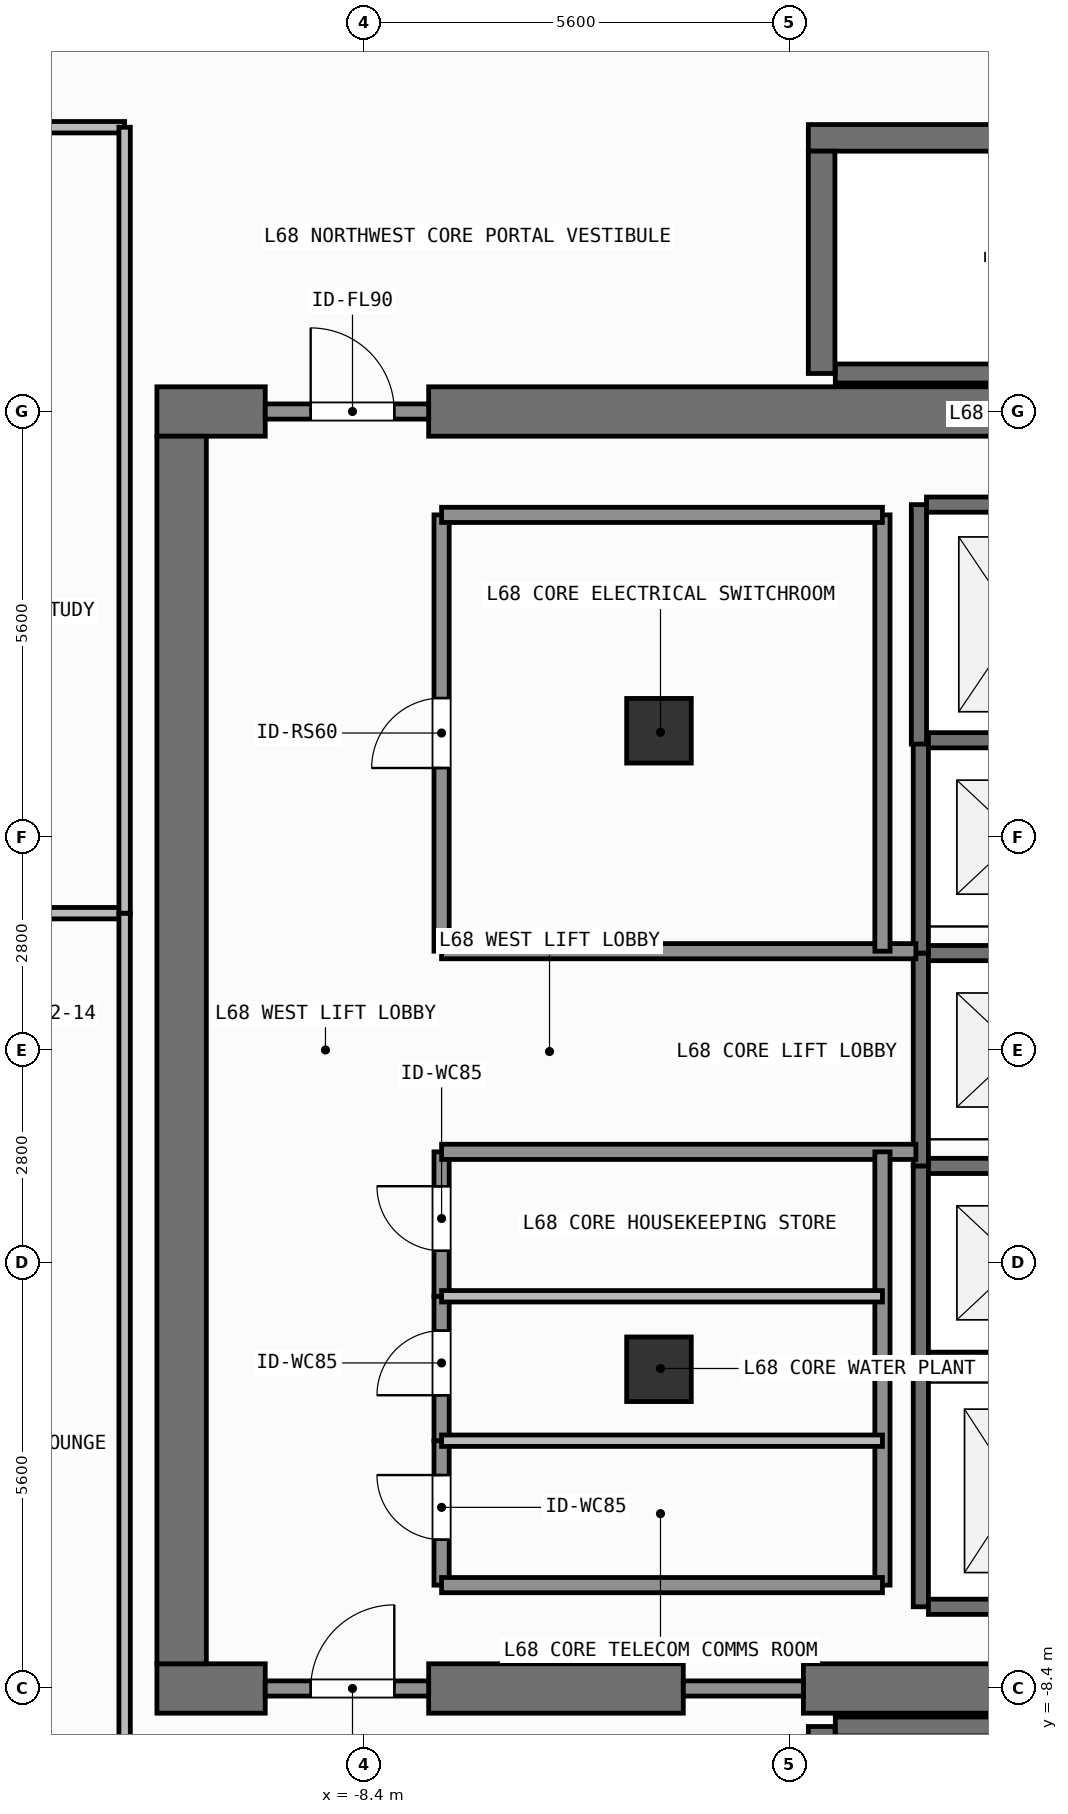
"""IFC4 building model, lengths in metres.
Left out: names, types, materials, properties, quantities, classifications, styles, units other than length and angle.
Written with IfcOpenShell. Run it as: python <this file> out.ifc"""

import sys

from ifc_helpers import new_model, si_unit, direction, frame, frame_2d, origin, origin_2d, place, context, subcontext, project, spatial, rectangle, extrude, element, fill, save


model = new_model("IFC4")
c1 = context("Model", 3, precision=1e-05, world=origin(), true_north=direction((0.0, 1.0)))
c2 = subcontext(c1, "Body", "Model", "MODEL_VIEW")
j1 = project(units=[si_unit("LENGTHUNIT", "METRE"), si_unit("PLANEANGLEUNIT", "RADIAN")], contexts=[c1])
p1 = place(None, origin())
s1 = spatial("IfcSite", under=j1, at=p1, CompositionType="ELEMENT")
p2 = place(p1, origin())
s2 = spatial("IfcBuilding", under=s1, at=p2, CompositionType="ELEMENT")
p3 = place(p2, frame((0.0, 0.0, 278.1)))
s3 = spatial("IfcBuildingStorey", under=s2, at=p3, CompositionType="ELEMENT", Elevation=278.1)
p4 = place(p3, frame((-11.125, -8.4, 0.0), z_axis=(0.0, 0.0, 1.0), x_axis=(1.0, 0.0, 0.0)))
e1 = element("IfcWall", 1, at=p4, inside=s3, PredefinedType="SHEAR", context=c2, shape_type="SweptSolid", body=[
    extrude(rectangle(XDim=1.425, YDim=0.65, at=frame_2d((0.712, 0.0))), origin(), (0.0, 0.0, 1.0), 3.9),
])
p5 = place(p3, frame((-7.55, -8.4, 0.0), z_axis=(0.0, 0.0, 1.0), x_axis=(1.0, 0.0, 0.0)))
e2 = element("IfcWall", 2, at=p5, inside=s3, PredefinedType="SHEAR", context=c2, shape_type="SweptSolid", body=[
    extrude(rectangle(XDim=3.35, YDim=0.65, at=frame_2d((1.675, 0.0))), origin(), (0.0, 0.0, 1.0), 3.9),
])
p6 = place(p3, frame((-2.62, -8.4, 0.0), z_axis=(0.0, 0.0, 1.0), x_axis=(1.0, 0.0, 0.0)))
e3 = element("IfcWall", 3, at=p6, inside=s3, PredefinedType="SHEAR", context=c2, shape_type="SweptSolid", body=[
    extrude(rectangle(XDim=7.27, YDim=0.65, at=frame_2d((3.635, 0.0))), origin(), (0.0, 0.0, 1.0), 3.9),
])
p7 = place(p3, frame((-11.125, 8.4, 0.0), z_axis=(0.0, 0.0, 1.0), x_axis=(1.0, 0.0, 0.0)))
e4 = element("IfcWall", 4, at=p7, inside=s3, PredefinedType="SHEAR", context=c2, shape_type="SweptSolid", body=[
    extrude(rectangle(XDim=1.425, YDim=0.65, at=frame_2d((0.712, 0.0))), origin(), (0.0, 0.0, 1.0), 3.9),
])
p8 = place(p3, frame((-7.55, 8.4, 0.0), z_axis=(0.0, 0.0, 1.0), x_axis=(1.0, 0.0, 0.0)))
e5 = element("IfcWall", 5, at=p8, inside=s3, PredefinedType="SHEAR", context=c2, shape_type="SweptSolid", body=[
    extrude(rectangle(XDim=16.275, YDim=0.65, at=frame_2d((8.138, 0.0))), origin(), (0.0, 0.0, 1.0), 3.9),
])
p9 = place(p3, frame((-10.8, -8.075, 0.0), z_axis=(0.0, 0.0, 1.0), x_axis=(0.0, 1.0, 0.0)))
e6 = element("IfcWall", 6, at=p9, inside=s3, PredefinedType="SHEAR", context=c2, shape_type="SweptSolid", body=[
    extrude(rectangle(XDim=16.15, YDim=0.65, at=frame_2d((8.075, 0.0))), origin(), (0.0, 0.0, 1.0), 3.9),
])
p10 = place(p3, frame((-2.2, -8.9, 0.0), z_axis=(0.0, 0.0, 1.0), x_axis=(1.0, 0.0, 0.0)))
e7 = element("IfcWall", 7, at=p10, inside=s3, PredefinedType="SHEAR", context=c2, shape_type="SweptSolid", body=[
    extrude(rectangle(XDim=6.6, YDim=0.25, at=frame_2d((3.3, 0.0))), origin(), (0.0, 0.0, 1.0), 3.9),
])
p11 = place(p3, frame((-2.38, -11.825, 0.0), z_axis=(0.0, 0.0, 1.0), x_axis=(0.0, 1.0, 0.0)))
e8 = element("IfcWall", 8, at=p11, inside=s3, PredefinedType="SHEAR", context=c2, shape_type="SweptSolid", body=[
    extrude(rectangle(XDim=2.925, YDim=0.35, at=frame_2d((1.462, 0.0))), origin(), (0.0, 0.0, 1.0), 3.9),
])
p12 = place(p3, frame((-2.555, 12.0, 0.0), z_axis=(0.0, 0.0, 1.0), x_axis=(1.0, 0.0, 0.0)))
e9 = element("IfcWall", 9, at=p12, inside=s3, PredefinedType="SHEAR", context=c2, shape_type="SweptSolid", body=[
    extrude(rectangle(XDim=7.31, YDim=0.35, at=frame_2d((3.655, 0.0))), origin(), (0.0, 0.0, 1.0), 3.9),
])
p13 = place(p3, frame((-2.2, 8.9, 0.0), z_axis=(0.0, 0.0, 1.0), x_axis=(1.0, 0.0, 0.0)))
e10 = element("IfcWall", 10, at=p13, inside=s3, PredefinedType="SHEAR", context=c2, shape_type="SweptSolid", body=[
    extrude(rectangle(XDim=6.6, YDim=0.25, at=frame_2d((3.3, 0.0))), origin(), (0.0, 0.0, 1.0), 3.9),
])
p14 = place(p3, frame((-2.38, 8.9, 0.0), z_axis=(0.0, 0.0, 1.0), x_axis=(0.0, 1.0, 0.0)))
e11 = element("IfcWall", 11, at=p14, inside=s3, PredefinedType="SHEAR", context=c2, shape_type="SweptSolid", body=[
    extrude(rectangle(XDim=2.925, YDim=0.35, at=frame_2d((1.462, 0.0))), origin(), (0.0, 0.0, 1.0), 3.9),
])
for number, where, z_axis, x_axis in (
    (12, (-4.52, -4.2, 0.0), (0.0, 0.0, 1.0), (1.0, 0.0, 0.0)),
    (13, (-4.52, 4.2, 0.0), (0.0, 0.0, 1.0), (1.0, 0.0, 0.0)),
):
    element("IfcColumn", number, at=place(p3, frame(where, z_axis=z_axis, x_axis=x_axis)), inside=s3, PredefinedType="COLUMN", context=c2, shape_type="SweptSolid", body=[
        extrude(rectangle(XDim=0.85, YDim=0.85, at=origin_2d()), origin(), (0.0, 0.0, 1.0), 3.9),
    ])
p15 = place(p3, frame((-1.075, -4.275, 0.0), z_axis=(0.0, 0.0, 1.0), x_axis=(0.0, 1.0, 0.0)))
e14 = element("IfcWall", 14, at=p15, inside=s3, PredefinedType="SHEAR", context=c2, shape_type="SweptSolid", body=[
    extrude(rectangle(XDim=2.75, YDim=0.2, at=frame_2d((1.375, 0.0))), origin(), (0.0, 0.0, 1.0), 3.68),
])
for number, where, z_axis, x_axis in (
    (15, (-0.975, -4.075, 0.0), (0.0, 0.0, 1.0), (1.0, 0.0, 0.0)),
    (16, (-0.975, -1.525, 0.0), (0.0, 0.0, 1.0), (1.0, 0.0, 0.0)),
):
    element("IfcWall", number, at=place(p3, frame(where, z_axis=z_axis, x_axis=x_axis)), inside=s3, PredefinedType="SHEAR", context=c2, shape_type="SweptSolid", body=[
        extrude(rectangle(XDim=2.35, YDim=0.2, at=frame_2d((1.175, 0.0))), origin(), (0.0, 0.0, 1.0), 3.68),
    ])
p16 = place(p3, frame((-1.075, -1.525, 0.0), z_axis=(0.0, 0.0, 1.0), x_axis=(0.0, 1.0, 0.0)))
e17 = element("IfcWall", 17, at=p16, inside=s3, PredefinedType="SHEAR", context=c2, shape_type="SweptSolid", body=[
    extrude(rectangle(XDim=2.8, YDim=0.2, at=frame_2d((1.4, 0.0))), origin(), (0.0, 0.0, 1.0), 3.68),
])
p17 = place(p3, frame((-0.975, 1.275, 0.0), z_axis=(0.0, 0.0, 1.0), x_axis=(1.0, 0.0, 0.0)))
e18 = element("IfcWall", 18, at=p17, inside=s3, PredefinedType="SHEAR", context=c2, shape_type="SweptSolid", body=[
    extrude(rectangle(XDim=2.35, YDim=0.2, at=frame_2d((1.175, 0.0))), origin(), (0.0, 0.0, 1.0), 3.68),
])
p18 = place(p3, frame((-1.075, 1.275, 0.0), z_axis=(0.0, 0.0, 1.0), x_axis=(0.0, 1.0, 0.0)))
e19 = element("IfcWall", 19, at=p18, inside=s3, PredefinedType="SHEAR", context=c2, shape_type="SweptSolid", body=[
    extrude(rectangle(XDim=2.8, YDim=0.2, at=frame_2d((1.4, 0.0))), origin(), (0.0, 0.0, 1.0), 3.68),
])
p19 = place(p3, frame((-0.975, 4.075, 0.0), z_axis=(0.0, 0.0, 1.0), x_axis=(1.0, 0.0, 0.0)))
e20 = element("IfcWall", 20, at=p19, inside=s3, PredefinedType="SHEAR", context=c2, shape_type="SweptSolid", body=[
    extrude(rectangle(XDim=2.35, YDim=0.2, at=frame_2d((1.175, 0.0))), origin(), (0.0, 0.0, 1.0), 3.68),
])
p20 = place(p3, frame((-1.1, 4.025, 0.0), z_axis=(0.0, 0.0, 1.0), x_axis=(0.0, 1.0, 0.0)))
e21 = element("IfcWall", 21, at=p20, inside=s3, PredefinedType="SHEAR", context=c2, shape_type="SweptSolid", body=[
    extrude(rectangle(XDim=3.15, YDim=0.2, at=frame_2d((1.575, 0.0))), origin(), (0.0, 0.0, 1.0), 3.68),
])
p21 = place(p3, frame((-1.0, 7.175, 0.0), z_axis=(0.0, 0.0, 1.0), x_axis=(1.0, 0.0, 0.0)))
e22 = element("IfcWall", 22, at=p21, inside=s3, PredefinedType="SHEAR", context=c2, shape_type="SweptSolid", body=[
    extrude(rectangle(XDim=2.4, YDim=0.2, at=frame_2d((1.2, 0.0))), origin(), (0.0, 0.0, 1.0), 3.68),
])
p22 = place(p3, frame((-1.075, -7.325, 0.0), z_axis=(0.0, 0.0, 1.0), x_axis=(0.0, 1.0, 0.0)))
e23 = element("IfcWall", 23, at=p22, inside=s3, PredefinedType="SHEAR", context=c2, shape_type="SweptSolid", body=[
    extrude(rectangle(XDim=3.05, YDim=0.2, at=frame_2d((1.525, 0.0))), origin(), (0.0, 0.0, 1.0), 3.68),
])
p23 = place(p3, frame((-0.975, -7.325, 0.0), z_axis=(0.0, 0.0, 1.0), x_axis=(1.0, 0.0, 0.0)))
e24 = element("IfcWall", 24, at=p23, inside=s3, PredefinedType="SHEAR", context=c2, shape_type="SweptSolid", body=[
    extrude(rectangle(XDim=2.35, YDim=0.2, at=frame_2d((1.175, 0.0))), origin(), (0.0, 0.0, 1.0), 3.68),
])
p24 = place(p3, frame((-9.7, -8.4, 0.0), z_axis=(0.0, 0.0, 1.0), x_axis=(1.0, 0.0, 0.0)))
e25 = element("IfcWall", 25, at=p24, inside=s3, PredefinedType="SOLIDWALL", context=c2, shape_type="SweptSolid", body=[
    extrude(rectangle(XDim=2.15, YDim=0.2, at=frame_2d((1.075, 0.0))), origin(), (0.0, 0.0, 1.0), 2.92),
])
p25 = place(p24, frame((0.598, 0.0, 0.0)))
e26 = element("IfcOpeningElement", 26, at=p25, cuts=e25, PredefinedType="OPENING", context=c2, shape_type="SweptSolid", body=[
    extrude(rectangle(XDim=1.1, YDim=2.15, at=frame_2d((0.55, 1.075))), frame((0.0, 0.11, 0.0), z_axis=(0.0, -1.0, 0.0), x_axis=(1.0, 0.0, 0.0)), (0.0, 0.0, 1.0), 0.22),
])
p26 = place(p3, frame((-9.7, 8.4, 0.0), z_axis=(0.0, 0.0, 1.0), x_axis=(1.0, 0.0, 0.0)))
e27 = element("IfcWall", 27, at=p26, inside=s3, PredefinedType="SOLIDWALL", context=c2, shape_type="SweptSolid", body=[
    extrude(rectangle(XDim=2.15, YDim=0.2, at=frame_2d((1.075, 0.0))), origin(), (0.0, 0.0, 1.0), 2.92),
])
p27 = place(p26, frame((0.598, 0.0, 0.0)))
e28 = element("IfcOpeningElement", 28, at=p27, cuts=e27, PredefinedType="OPENING", context=c2, shape_type="SweptSolid", body=[
    extrude(rectangle(XDim=1.1, YDim=2.15, at=frame_2d((0.55, 1.075))), frame((0.0, 0.11, 0.0), z_axis=(0.0, -1.0, 0.0), x_axis=(1.0, 0.0, 0.0)), (0.0, 0.0, 1.0), 0.22),
])
p28 = place(p3, frame((-7.38, -7.04, 0.0), z_axis=(0.0, 0.0, 1.0), x_axis=(0.0, 1.0, 0.0)))
e29 = element("IfcWall", 29, at=p28, inside=s3, PredefinedType="SOLIDWALL", context=c2, shape_type="SweptSolid", body=[
    extrude(rectangle(XDim=1.9, YDim=0.2, at=frame_2d((0.95, 0.0))), origin(), (0.0, 0.0, 1.0), 3.68),
])
p29 = place(p28, frame((0.598, 0.0, 0.0)))
e30 = element("IfcOpeningElement", 30, at=p29, cuts=e29, PredefinedType="OPENING", context=c2, shape_type="SweptSolid", body=[
    extrude(rectangle(XDim=0.85, YDim=2.1, at=frame_2d((0.425, 1.05))), frame((0.0, 0.11, 0.0), z_axis=(0.0, -1.0, 0.0), x_axis=(1.0, 0.0, 0.0)), (0.0, 0.0, 1.0), 0.22),
])
p30 = place(p3, frame((-7.38, -5.14, 0.0), z_axis=(0.0, 0.0, 1.0), x_axis=(0.0, 1.0, 0.0)))
e31 = element("IfcWall", 31, at=p30, inside=s3, PredefinedType="SOLIDWALL", context=c2, shape_type="SweptSolid", body=[
    extrude(rectangle(XDim=1.9, YDim=0.2, at=frame_2d((0.95, 0.0))), origin(), (0.0, 0.0, 1.0), 3.68),
])
p31 = place(p30, frame((0.598, 0.0, 0.0)))
e32 = element("IfcOpeningElement", 32, at=p31, cuts=e31, PredefinedType="OPENING", context=c2, shape_type="SweptSolid", body=[
    extrude(rectangle(XDim=0.85, YDim=2.1, at=frame_2d((0.425, 1.05))), frame((0.0, 0.11, 0.0), z_axis=(0.0, -1.0, 0.0), x_axis=(1.0, 0.0, 0.0)), (0.0, 0.0, 1.0), 0.22),
])
p32 = place(p3, frame((-7.38, -3.24, 0.0), z_axis=(0.0, 0.0, 1.0), x_axis=(0.0, 1.0, 0.0)))
e33 = element("IfcWall", 33, at=p32, inside=s3, PredefinedType="SOLIDWALL", context=c2, shape_type="SweptSolid", body=[
    extrude(rectangle(XDim=1.9, YDim=0.2, at=frame_2d((0.95, 0.0))), origin(), (0.0, 0.0, 1.0), 3.68),
])
p33 = place(p32, frame((0.598, 0.0, 0.0)))
e34 = element("IfcOpeningElement", 34, at=p33, cuts=e33, PredefinedType="OPENING", context=c2, shape_type="SweptSolid", body=[
    extrude(rectangle(XDim=0.85, YDim=2.1, at=frame_2d((0.425, 1.05))), frame((0.0, 0.11, 0.0), z_axis=(0.0, -1.0, 0.0), x_axis=(1.0, 0.0, 0.0)), (0.0, 0.0, 1.0), 0.22),
])
p34 = place(p3, frame((-7.38, 1.3, 0.0), z_axis=(0.0, 0.0, 1.0), x_axis=(0.0, 1.0, 0.0)))
e35 = element("IfcWall", 35, at=p34, inside=s3, PredefinedType="SOLIDWALL", context=c2, shape_type="SweptSolid", body=[
    extrude(rectangle(XDim=5.74, YDim=0.2, at=frame_2d((2.87, 0.0))), origin(), (0.0, 0.0, 1.0), 3.68),
])
p35 = place(p34, frame((2.41, 0.0, 0.0)))
e36 = element("IfcOpeningElement", 36, at=p35, cuts=e35, PredefinedType="OPENING", context=c2, shape_type="SweptSolid", body=[
    extrude(rectangle(XDim=0.92, YDim=2.1, at=frame_2d((0.46, 1.05))), frame((0.0, 0.11, 0.0), z_axis=(0.0, -1.0, 0.0), x_axis=(1.0, 0.0, 0.0)), (0.0, 0.0, 1.0), 0.22),
])
p36 = place(p3, frame((-16.93, 12.14, 0.0), z_axis=(0.0, 0.0, 1.0), x_axis=(1.0, 0.0, 0.0)))
e37 = element("IfcWall", 37, at=p36, inside=s3, PredefinedType="PARTITIONING", context=c2, shape_type="SweptSolid", body=[
    extrude(rectangle(XDim=5.38, YDim=0.15, at=frame_2d((2.69, 0.0))), origin(), (0.0, 0.0, 1.0), 3.68),
])
p37 = place(p36, frame((2.24, 0.0, 0.0)))
e38 = element("IfcOpeningElement", 38, at=p37, cuts=e37, PredefinedType="OPENING", context=c2, shape_type="SweptSolid", body=[
    extrude(rectangle(XDim=0.9, YDim=2.1, at=frame_2d((0.45, 1.05))), frame((0.0, 0.085, 0.0), z_axis=(0.0, -1.0, 0.0), x_axis=(1.0, 0.0, 0.0)), (0.0, 0.0, 1.0), 0.17),
])
p38 = place(p3, frame((-4.2, -8.4, 0.0), z_axis=(0.0, 0.0, 1.0), x_axis=(1.0, 0.0, 0.0)))
e39 = element("IfcWall", 39, at=p38, inside=s3, PredefinedType="SOLIDWALL", context=c2, shape_type="SweptSolid", body=[
    extrude(rectangle(XDim=1.58, YDim=0.2, at=frame_2d((0.79, 0.0))), origin(), (0.0, 0.0, 1.0), 2.92),
])
for number, where, z_axis, x_axis in (
    (40, (-7.38, -1.34, 0.0), (0.0, 0.0, 1.0), (1.0, 0.0, 0.0)),
    (41, (-7.38, 1.3, 0.0), (0.0, 0.0, 1.0), (1.0, 0.0, 0.0)),
):
    element("IfcWall", number, at=place(p3, frame(where, z_axis=z_axis, x_axis=x_axis)), inside=s3, PredefinedType="SOLIDWALL", context=c2, shape_type="SweptSolid", body=[
        extrude(rectangle(XDim=6.24, YDim=0.2, at=frame_2d((3.12, 0.0))), origin(), (0.0, 0.0, 1.0), 3.68),
    ])
p39 = place(p3, frame((-1.58, -7.04, 0.0), z_axis=(0.0, 0.0, 1.0), x_axis=(0.0, 1.0, 0.0)))
e42 = element("IfcWall", 42, at=p39, inside=s3, PredefinedType="SOLIDWALL", context=c2, shape_type="SweptSolid", body=[
    extrude(rectangle(XDim=5.7, YDim=0.2, at=frame_2d((2.85, 0.0))), origin(), (0.0, 0.0, 1.0), 3.68),
])
p40 = place(p3, frame((-7.38, -7.04, 0.0), z_axis=(0.0, 0.0, 1.0), x_axis=(1.0, 0.0, 0.0)))
e43 = element("IfcWall", 43, at=p40, inside=s3, PredefinedType="SOLIDWALL", context=c2, shape_type="SweptSolid", body=[
    extrude(rectangle(XDim=5.8, YDim=0.2, at=frame_2d((2.9, 0.0))), origin(), (0.0, 0.0, 1.0), 3.68),
])
p41 = place(p3, frame((-1.58, 1.3, 0.0), z_axis=(0.0, 0.0, 1.0), x_axis=(0.0, 1.0, 0.0)))
e44 = element("IfcWall", 44, at=p41, inside=s3, PredefinedType="SOLIDWALL", context=c2, shape_type="SweptSolid", body=[
    extrude(rectangle(XDim=5.74, YDim=0.2, at=frame_2d((2.87, 0.0))), origin(), (0.0, 0.0, 1.0), 3.68),
])
p42 = place(p3, frame((-7.38, 7.04, 0.0), z_axis=(0.0, 0.0, 1.0), x_axis=(1.0, 0.0, 0.0)))
e45 = element("IfcWall", 45, at=p42, inside=s3, PredefinedType="SOLIDWALL", context=c2, shape_type="SweptSolid", body=[
    extrude(rectangle(XDim=5.8, YDim=0.2, at=frame_2d((2.9, 0.0))), origin(), (0.0, 0.0, 1.0), 3.68),
])
for number, where, z_axis, x_axis in (
    (46, (-7.38, -5.14, 0.0), (0.0, 0.0, 1.0), (1.0, 0.0, 0.0)),
    (47, (-7.38, -3.24, 0.0), (0.0, 0.0, 1.0), (1.0, 0.0, 0.0)),
):
    element("IfcWall", number, at=place(p3, frame(where, z_axis=z_axis, x_axis=x_axis)), inside=s3, PredefinedType="PARTITIONING", context=c2, shape_type="SweptSolid", body=[
        extrude(rectangle(XDim=5.8, YDim=0.15, at=frame_2d((2.9, 0.0))), origin(), (0.0, 0.0, 1.0), 3.68),
    ])
p43 = place(p3, frame((-16.93, 1.8, 0.0), z_axis=(0.0, 0.0, 1.0), x_axis=(1.0, 0.0, 0.0)))
e48 = element("IfcWall", 48, at=p43, inside=s3, PredefinedType="PARTITIONING", context=c2, shape_type="SweptSolid", body=[
    extrude(rectangle(XDim=5.38, YDim=0.15, at=frame_2d((2.69, 0.0))), origin(), (0.0, 0.0, 1.0), 3.68),
])
p44 = place(p3, frame((-11.55, -12.14, 0.0), z_axis=(0.0, 0.0, 1.0), x_axis=(0.0, 1.0, 0.0)))
e49 = element("IfcWall", 49, at=p44, inside=s3, PredefinedType="PARTITIONING", context=c2, shape_type="SweptSolid", body=[
    extrude(rectangle(XDim=13.94, YDim=0.15, at=frame_2d((6.97, 0.0))), origin(), (0.0, 0.0, 1.0), 3.68),
])
p45 = place(p3, frame((-11.55, 1.8, 0.0), z_axis=(0.0, 0.0, 1.0), x_axis=(0.0, 1.0, 0.0)))
e50 = element("IfcWall", 50, at=p45, inside=s3, PredefinedType="PARTITIONING", context=c2, shape_type="SweptSolid", body=[
    extrude(rectangle(XDim=10.34, YDim=0.15, at=frame_2d((5.17, 0.0))), origin(), (0.0, 0.0, 1.0), 3.68),
])
p46 = place(p25, origin())
e51 = element("IfcDoor", 51, at=p46, inside=s3, OperationType="SINGLE_SWING_RIGHT", PredefinedType="DOOR", context=c2, shape_type="SweptSolid", body=[
    extrude(rectangle(XDim=1.1, YDim=2.15, at=frame_2d((0.55, 1.075))), frame((0.0, 0.025, 0.0), z_axis=(0.0, -1.0, 0.0), x_axis=(1.0, 0.0, 0.0)), (0.0, 0.0, 1.0), 0.05),
])
fill(e26, e51)
p47 = place(p27, origin())
e52 = element("IfcDoor", 52, at=p47, inside=s3, OperationType="SINGLE_SWING_LEFT", PredefinedType="DOOR", context=c2, shape_type="SweptSolid", body=[
    extrude(rectangle(XDim=1.1, YDim=2.15, at=frame_2d((0.55, 1.075))), frame((0.0, 0.025, 0.0), z_axis=(0.0, -1.0, 0.0), x_axis=(1.0, 0.0, 0.0)), (0.0, 0.0, 1.0), 0.05),
])
fill(e28, e52)
p48 = place(p29, origin())
e53 = element("IfcDoor", 53, at=p48, inside=s3, OperationType="SINGLE_SWING_RIGHT", PredefinedType="DOOR", context=c2, shape_type="SweptSolid", body=[
    extrude(rectangle(XDim=0.85, YDim=2.1, at=frame_2d((0.425, 1.05))), frame((0.0, 0.025, 0.0), z_axis=(0.0, -1.0, 0.0), x_axis=(1.0, 0.0, 0.0)), (0.0, 0.0, 1.0), 0.05),
])
fill(e30, e53)
p49 = place(p31, origin())
e54 = element("IfcDoor", 54, at=p49, inside=s3, OperationType="SINGLE_SWING_LEFT", PredefinedType="DOOR", context=c2, shape_type="SweptSolid", body=[
    extrude(rectangle(XDim=0.85, YDim=2.1, at=frame_2d((0.425, 1.05))), frame((0.0, 0.025, 0.0), z_axis=(0.0, -1.0, 0.0), x_axis=(1.0, 0.0, 0.0)), (0.0, 0.0, 1.0), 0.05),
])
fill(e32, e54)
p50 = place(p33, origin())
e55 = element("IfcDoor", 55, at=p50, inside=s3, OperationType="SINGLE_SWING_RIGHT", PredefinedType="DOOR", context=c2, shape_type="SweptSolid", body=[
    extrude(rectangle(XDim=0.85, YDim=2.1, at=frame_2d((0.425, 1.05))), frame((0.0, 0.025, 0.0), z_axis=(0.0, -1.0, 0.0), x_axis=(1.0, 0.0, 0.0)), (0.0, 0.0, 1.0), 0.05),
])
fill(e34, e55)
p51 = place(p35, origin())
e56 = element("IfcDoor", 56, at=p51, inside=s3, OperationType="SINGLE_SWING_LEFT", PredefinedType="DOOR", context=c2, shape_type="SweptSolid", body=[
    extrude(rectangle(XDim=0.92, YDim=2.1, at=frame_2d((0.46, 1.05))), frame((0.0, 0.025, 0.0), z_axis=(0.0, -1.0, 0.0), x_axis=(1.0, 0.0, 0.0)), (0.0, 0.0, 1.0), 0.05),
])
fill(e36, e56)
save(model, sys.argv[1])
